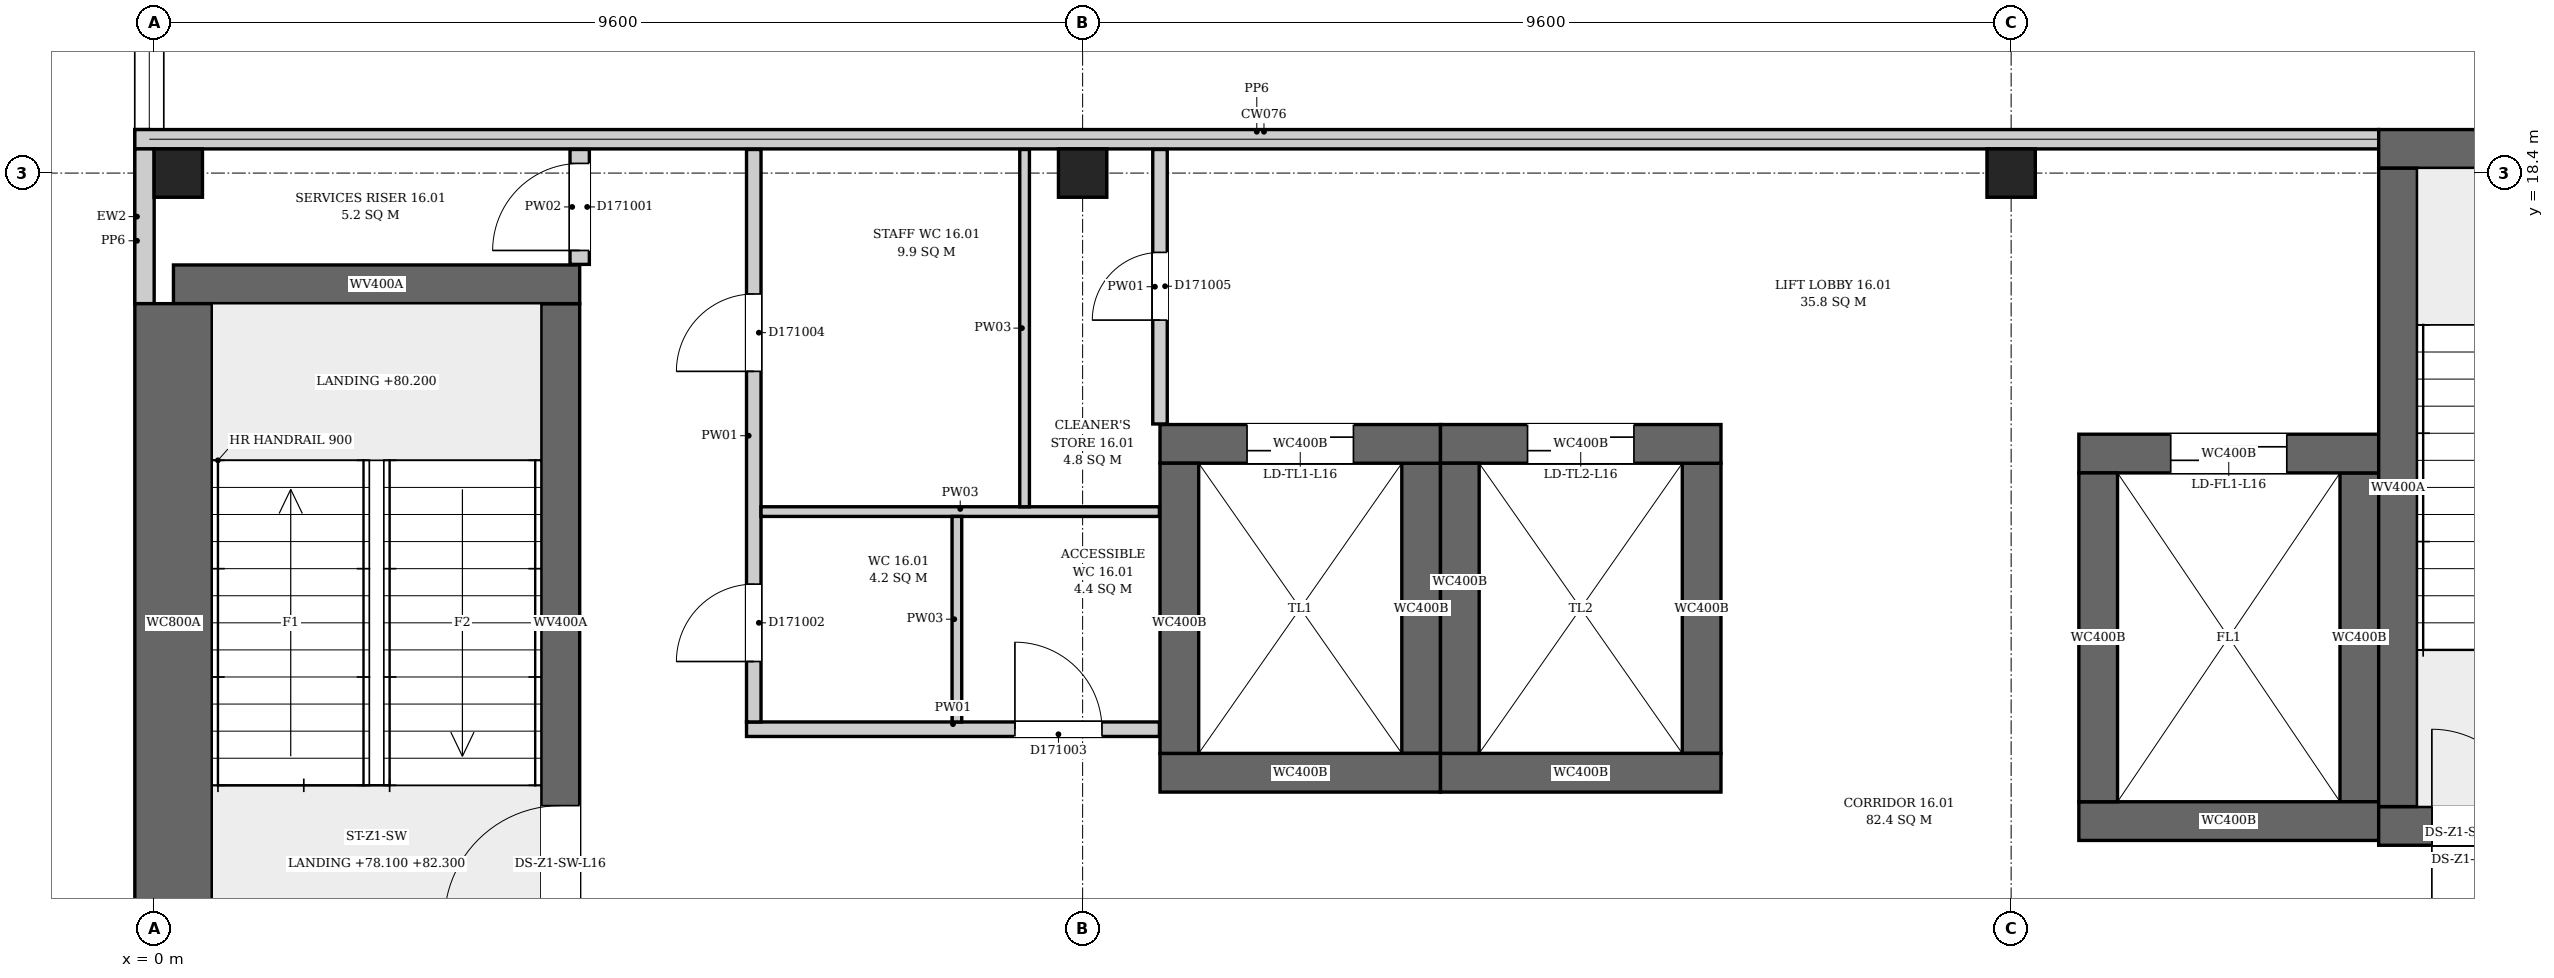
"""IFC4 building model, lengths in metres.
Left out: names, types, materials, properties, quantities, classifications, styles, units other than length and angle.
Written with IfcOpenShell. Run it as: python <this file> out.ifc"""

import sys

from ifc_helpers import new_model, si_unit, direction, frame, frame_2d, origin, origin_2d, place, context, subcontext, project, spatial, rectangle, extrude, element, fill, save


model = new_model("IFC4")
c1 = context("Model", 3, precision=1e-05, world=origin(), true_north=direction((0.0, 1.0)))
c2 = subcontext(c1, "Body", "Model", "MODEL_VIEW")
j1 = project(units=[si_unit("LENGTHUNIT", "METRE"), si_unit("PLANEANGLEUNIT", "RADIAN")], contexts=[c1])
p1 = place(None, origin())
s1 = spatial("IfcSite", under=j1, at=p1, CompositionType="ELEMENT")
p2 = place(p1, origin())
s2 = spatial("IfcBuilding", under=s1, at=p2, CompositionType="ELEMENT")
p3 = place(p2, frame((0.0, 0.0, 78.1)))
s3 = spatial("IfcBuildingStorey", under=s2, at=p3, CompositionType="ELEMENT", Elevation=78.1)
p4 = place(p3, frame((0.2, 17.25, 0.0), z_axis=(0.0, 0.0, 1.0), x_axis=(1.0, 0.0, 0.0)))
e1 = element("IfcWall", 1, at=p4, inside=s3, PredefinedType="SHEAR", context=c2, shape_type="SweptSolid", body=[
    extrude(rectangle(XDim=4.2, YDim=0.4, at=frame_2d((2.1, 0.0))), origin(), (0.0, 0.0, 1.0), 7.1),
])
p5 = place(p3, frame((0.2, 10.45, 0.0), z_axis=(0.0, 0.0, 1.0), x_axis=(0.0, 1.0, 0.0)))
e2 = element("IfcWall", 2, at=p5, inside=s3, PredefinedType="SHEAR", context=c2, shape_type="SweptSolid", body=[
    extrude(rectangle(XDim=6.6, YDim=0.8, at=frame_2d((3.3, 0.0))), origin(), (0.0, 0.0, 1.0), 7.1),
])
p6 = place(p3, frame((4.2, 10.45, 0.0), z_axis=(0.0, 0.0, 1.0), x_axis=(0.0, 1.0, 0.0)))
e3 = element("IfcWall", 3, at=p6, inside=s3, PredefinedType="SHEAR", context=c2, shape_type="SweptSolid", body=[
    extrude(rectangle(XDim=6.6, YDim=0.4, at=frame_2d((3.3, 0.0))), origin(), (0.0, 0.0, 1.0), 7.1),
])
p7 = place(p6, frame((0.21, 0.0, 0.0)))
e4 = element("IfcOpeningElement", 4, at=p7, cuts=e3, PredefinedType="OPENING", context=c2, shape_type="SweptSolid", body=[
    extrude(rectangle(XDim=1.2, YDim=2.1, at=frame_2d((0.6, 1.05))), frame((0.0, 0.21, 0.0), z_axis=(0.0, -1.0, 0.0), x_axis=(1.0, 0.0, 0.0)), (0.0, 0.0, 1.0), 0.42),
])
p8 = place(p3, frame((23.0, 11.65, 0.0), z_axis=(0.0, 0.0, 1.0), x_axis=(1.0, 0.0, 0.0)))
e5 = element("IfcWall", 5, at=p8, inside=s3, PredefinedType="SHEAR", context=c2, shape_type="SweptSolid", body=[
    extrude(rectangle(XDim=4.2, YDim=0.4, at=frame_2d((2.1, 0.0))), origin(), (0.0, 0.0, 1.0), 7.1),
])
p9 = place(p8, frame((0.55, 0.0, 0.0)))
e6 = element("IfcOpeningElement", 6, at=p9, cuts=e5, PredefinedType="OPENING", context=c2, shape_type="SweptSolid", body=[
    extrude(rectangle(XDim=1.0, YDim=2.1, at=frame_2d((0.5, 1.05))), frame((0.0, 0.21, 0.0), z_axis=(0.0, -1.0, 0.0), x_axis=(1.0, 0.0, 0.0)), (0.0, 0.0, 1.0), 0.42),
])
p10 = place(p8, frame((2.65, 0.0, 0.0)))
e7 = element("IfcOpeningElement", 7, at=p10, cuts=e5, PredefinedType="OPENING", context=c2, shape_type="SweptSolid", body=[
    extrude(rectangle(XDim=1.0, YDim=2.1, at=frame_2d((0.5, 1.05))), frame((0.0, 0.21, 0.0), z_axis=(0.0, -1.0, 0.0), x_axis=(1.0, 0.0, 0.0)), (0.0, 0.0, 1.0), 0.42),
])
p11 = place(p8, frame((0.55, 0.0, 4.2)))
e8 = element("IfcOpeningElement", 8, at=p11, cuts=e5, PredefinedType="OPENING", context=c2, shape_type="SweptSolid", body=[
    extrude(rectangle(XDim=1.0, YDim=2.1, at=frame_2d((0.5, 1.05))), frame((0.0, 0.21, 0.0), z_axis=(0.0, -1.0, 0.0), x_axis=(1.0, 0.0, 0.0)), (0.0, 0.0, 1.0), 0.42),
])
p12 = place(p8, frame((2.65, 0.0, 4.2)))
e9 = element("IfcOpeningElement", 9, at=p12, cuts=e5, PredefinedType="OPENING", context=c2, shape_type="SweptSolid", body=[
    extrude(rectangle(XDim=1.0, YDim=2.1, at=frame_2d((0.5, 1.05))), frame((0.0, 0.21, 0.0), z_axis=(0.0, -1.0, 0.0), x_axis=(1.0, 0.0, 0.0)), (0.0, 0.0, 1.0), 0.42),
])
p13 = place(p3, frame((23.0, 18.65, 0.0), z_axis=(0.0, 0.0, 1.0), x_axis=(1.0, 0.0, 0.0)))
e10 = element("IfcWall", 10, at=p13, inside=s3, PredefinedType="SHEAR", context=c2, shape_type="SweptSolid", body=[
    extrude(rectangle(XDim=4.2, YDim=0.4, at=frame_2d((2.1, 0.0))), origin(), (0.0, 0.0, 1.0), 7.1),
])
p14 = place(p3, frame((23.2, 11.85, 0.0), z_axis=(0.0, 0.0, 1.0), x_axis=(0.0, 1.0, 0.0)))
e11 = element("IfcWall", 11, at=p14, inside=s3, PredefinedType="SHEAR", context=c2, shape_type="SweptSolid", body=[
    extrude(rectangle(XDim=6.6, YDim=0.4, at=frame_2d((3.3, 0.0))), origin(), (0.0, 0.0, 1.0), 7.1),
])
p15 = place(p3, frame((10.4, 12.2, 0.0), z_axis=(0.0, 0.0, 1.0), x_axis=(1.0, 0.0, 0.0)))
e12 = element("IfcWall", 12, at=p15, inside=s3, PredefinedType="SHEAR", context=c2, shape_type="SweptSolid", body=[
    extrude(rectangle(XDim=2.9, YDim=0.4, at=frame_2d((1.45, 0.0))), origin(), (0.0, 0.0, 1.0), 7.6),
])
p16 = place(p3, frame((10.4, 15.6, 0.0), z_axis=(0.0, 0.0, 1.0), x_axis=(1.0, 0.0, 0.0)))
e13 = element("IfcWall", 13, at=p16, inside=s3, PredefinedType="SHEAR", context=c2, shape_type="SweptSolid", body=[
    extrude(rectangle(XDim=2.9, YDim=0.4, at=frame_2d((1.45, 0.0))), origin(), (0.0, 0.0, 1.0), 7.6),
])
p17 = place(p16, frame((0.9, 0.0, 0.0)))
e14 = element("IfcOpeningElement", 14, at=p17, cuts=e13, PredefinedType="OPENING", context=c2, shape_type="SweptSolid", body=[
    extrude(rectangle(XDim=1.1, YDim=2.1, at=frame_2d((0.55, 1.05))), frame((0.0, 0.21, 0.0), z_axis=(0.0, -1.0, 0.0), x_axis=(1.0, 0.0, 0.0)), (0.0, 0.0, 1.0), 0.42),
])
for number, where, z_axis, x_axis in (
    (15, (10.6, 12.4, 0.0), (0.0, 0.0, 1.0), (0.0, 1.0, 0.0)),
    (16, (13.1, 12.4, 0.0), (0.0, 0.0, 1.0), (0.0, 1.0, 0.0)),
):
    element("IfcWall", number, at=place(p3, frame(where, z_axis=z_axis, x_axis=x_axis)), inside=s3, PredefinedType="SHEAR", context=c2, shape_type="SweptSolid", body=[
        extrude(rectangle(XDim=3.0, YDim=0.4, at=frame_2d((1.5, 0.0))), origin(), (0.0, 0.0, 1.0), 7.6),
    ])
p18 = place(p3, frame((13.3, 12.2, 0.0), z_axis=(0.0, 0.0, 1.0), x_axis=(1.0, 0.0, 0.0)))
e17 = element("IfcWall", 17, at=p18, inside=s3, PredefinedType="SHEAR", context=c2, shape_type="SweptSolid", body=[
    extrude(rectangle(XDim=2.9, YDim=0.4, at=frame_2d((1.45, 0.0))), origin(), (0.0, 0.0, 1.0), 7.6),
])
p19 = place(p3, frame((13.3, 15.6, 0.0), z_axis=(0.0, 0.0, 1.0), x_axis=(1.0, 0.0, 0.0)))
e18 = element("IfcWall", 18, at=p19, inside=s3, PredefinedType="SHEAR", context=c2, shape_type="SweptSolid", body=[
    extrude(rectangle(XDim=2.9, YDim=0.4, at=frame_2d((1.45, 0.0))), origin(), (0.0, 0.0, 1.0), 7.6),
])
p20 = place(p19, frame((0.9, 0.0, 0.0)))
e19 = element("IfcOpeningElement", 19, at=p20, cuts=e18, PredefinedType="OPENING", context=c2, shape_type="SweptSolid", body=[
    extrude(rectangle(XDim=1.1, YDim=2.1, at=frame_2d((0.55, 1.05))), frame((0.0, 0.21, 0.0), z_axis=(0.0, -1.0, 0.0), x_axis=(1.0, 0.0, 0.0)), (0.0, 0.0, 1.0), 0.42),
])
for number, where, z_axis, x_axis in (
    (20, (13.5, 12.4, 0.0), (0.0, 0.0, 1.0), (0.0, 1.0, 0.0)),
    (21, (16.0, 12.4, 0.0), (0.0, 0.0, 1.0), (0.0, 1.0, 0.0)),
):
    element("IfcWall", number, at=place(p3, frame(where, z_axis=z_axis, x_axis=x_axis)), inside=s3, PredefinedType="SHEAR", context=c2, shape_type="SweptSolid", body=[
        extrude(rectangle(XDim=3.0, YDim=0.4, at=frame_2d((1.5, 0.0))), origin(), (0.0, 0.0, 1.0), 7.6),
    ])
p21 = place(p3, frame((19.9, 11.7, 0.0), z_axis=(0.0, 0.0, 1.0), x_axis=(1.0, 0.0, 0.0)))
e22 = element("IfcWall", 22, at=p21, inside=s3, PredefinedType="SHEAR", context=c2, shape_type="SweptSolid", body=[
    extrude(rectangle(XDim=3.1, YDim=0.4, at=frame_2d((1.55, 0.0))), origin(), (0.0, 0.0, 1.0), 7.6),
])
p22 = place(p3, frame((19.9, 15.5, 0.0), z_axis=(0.0, 0.0, 1.0), x_axis=(1.0, 0.0, 0.0)))
e23 = element("IfcWall", 23, at=p22, inside=s3, PredefinedType="SHEAR", context=c2, shape_type="SweptSolid", body=[
    extrude(rectangle(XDim=3.1, YDim=0.4, at=frame_2d((1.55, 0.0))), origin(), (0.0, 0.0, 1.0), 7.6),
])
p23 = place(p22, frame((0.95, 0.0, 0.0)))
e24 = element("IfcOpeningElement", 24, at=p23, cuts=e23, PredefinedType="OPENING", context=c2, shape_type="SweptSolid", body=[
    extrude(rectangle(XDim=1.2, YDim=2.1, at=frame_2d((0.6, 1.05))), frame((0.0, 0.21, 0.0), z_axis=(0.0, -1.0, 0.0), x_axis=(1.0, 0.0, 0.0)), (0.0, 0.0, 1.0), 0.42),
])
for number, where, z_axis, x_axis in (
    (25, (20.1, 11.9, 0.0), (0.0, 0.0, 1.0), (0.0, 1.0, 0.0)),
    (26, (22.8, 11.9, 0.0), (0.0, 0.0, 1.0), (0.0, 1.0, 0.0)),
):
    element("IfcWall", number, at=place(p3, frame(where, z_axis=z_axis, x_axis=x_axis)), inside=s3, PredefinedType="SHEAR", context=c2, shape_type="SweptSolid", body=[
        extrude(rectangle(XDim=3.4, YDim=0.4, at=frame_2d((1.7, 0.0))), origin(), (0.0, 0.0, 1.0), 7.6),
    ])
for number, where, z_axis, x_axis in (
    (27, (0.25, 18.4, 0.0), (0.0, 0.0, 1.0), (1.0, 0.0, 0.0)),
    (28, (9.6, 18.4, 0.0), (0.0, 0.0, 1.0), (1.0, 0.0, 0.0)),
    (29, (19.2, 18.4, 0.0), (0.0, 0.0, 1.0), (1.0, 0.0, 0.0)),
):
    element("IfcColumn", number, at=place(p3, frame(where, z_axis=z_axis, x_axis=x_axis)), inside=s3, PredefinedType="COLUMN", context=c2, shape_type="SweptSolid", body=[
        extrude(rectangle(XDim=0.5, YDim=0.5, at=origin_2d()), origin(), (0.0, 0.0, 1.0), 3.9),
    ])
p24 = place(p3, frame((-0.125, 18.85, 0.0), z_axis=(0.0, 0.0, 1.0), x_axis=(0.0, -1.0, 0.0)))
e30 = element("IfcWall", 30, at=p24, inside=s3, PredefinedType="ELEMENTEDWALL", context=c2, shape_type="SweptSolid", body=[
    extrude(rectangle(XDim=1.8, YDim=0.15, at=frame_2d((0.9, 0.0))), origin(), (0.0, 0.0, 1.0), 3.9),
])
p25 = place(p3, frame((23.0, 18.75, 4.2), z_axis=(0.0, 0.0, 1.0), x_axis=(-1.0, 0.0, 0.0)))
e31 = element("IfcWall", 31, at=p25, inside=s3, PredefinedType="PARAPET", context=c2, shape_type="SweptSolid", body=[
    extrude(rectangle(XDim=23.2, YDim=0.2, at=frame_2d((11.6, 0.0))), origin(), (0.0, 0.0, 1.0), 1.1),
])
p26 = place(p3, frame((-0.099, 18.65, 4.2), z_axis=(0.0, 0.0, 1.0), x_axis=(0.0, -1.0, 0.0)))
e32 = element("IfcWall", 32, at=p26, inside=s3, PredefinedType="PARAPET", context=c2, shape_type="SweptSolid", body=[
    extrude(rectangle(XDim=1.6, YDim=0.2, at=frame_2d((0.8, 0.0))), origin(), (0.0, 0.0, 1.0), 1.1),
])
p27 = place(p3, frame((4.4, 17.456, 0.0), z_axis=(0.0, 0.0, 1.0), x_axis=(0.0, 1.0, 0.0)))
e33 = element("IfcWall", 33, at=p27, inside=s3, PredefinedType="PARTITIONING", context=c2, shape_type="SweptSolid", body=[
    extrude(rectangle(XDim=1.188, YDim=0.2, at=frame_2d((0.594, 0.0))), origin(), (0.0, 0.0, 1.0), 3.9),
])
p28 = place(p27, frame((0.144, 0.0, 0.0)))
e34 = element("IfcOpeningElement", 34, at=p28, cuts=e33, PredefinedType="OPENING", context=c2, shape_type="SweptSolid", body=[
    extrude(rectangle(XDim=0.9, YDim=2.1, at=frame_2d((0.45, 1.05))), frame((0.0, 0.11, 0.0), z_axis=(0.0, -1.0, 0.0), x_axis=(1.0, 0.0, 0.0)), (0.0, 0.0, 1.0), 0.22),
])
p29 = place(p3, frame((6.125, 12.65, 0.0), z_axis=(0.0, 0.0, 1.0), x_axis=(1.0, 0.0, 0.0)))
e35 = element("IfcWall", 35, at=p29, inside=s3, PredefinedType="PARTITIONING", context=c2, shape_type="SweptSolid", body=[
    extrude(rectangle(XDim=4.269, YDim=0.15, at=frame_2d((2.135, 0.0))), origin(), (0.0, 0.0, 1.0), 3.9),
])
p30 = place(p29, frame((2.775, 0.0, 0.0)))
e36 = element("IfcOpeningElement", 36, at=p30, cuts=e35, PredefinedType="OPENING", context=c2, shape_type="SweptSolid", body=[
    extrude(rectangle(XDim=0.9, YDim=2.1, at=frame_2d((0.45, 1.05))), frame((0.0, 0.085, 0.0), z_axis=(0.0, -1.0, 0.0), x_axis=(1.0, 0.0, 0.0)), (0.0, 0.0, 1.0), 0.17),
])
p31 = place(p3, frame((6.2, 12.725, 0.0), z_axis=(0.0, 0.0, 1.0), x_axis=(0.0, 1.0, 0.0)))
e37 = element("IfcWall", 37, at=p31, inside=s3, PredefinedType="PARTITIONING", context=c2, shape_type="SweptSolid", body=[
    extrude(rectangle(XDim=5.919, YDim=0.15, at=frame_2d((2.959, 0.0))), origin(), (0.0, 0.0, 1.0), 3.9),
])
p32 = place(p31, frame((0.625, 0.0, 0.0)))
e38 = element("IfcOpeningElement", 38, at=p32, cuts=e37, PredefinedType="OPENING", context=c2, shape_type="SweptSolid", body=[
    extrude(rectangle(XDim=0.8, YDim=2.1, at=frame_2d((0.4, 1.05))), frame((0.0, 0.085, 0.0), z_axis=(0.0, -1.0, 0.0), x_axis=(1.0, 0.0, 0.0)), (0.0, 0.0, 1.0), 0.17),
])
p33 = place(p31, frame((3.625, 0.0, 0.0)))
e39 = element("IfcOpeningElement", 39, at=p33, cuts=e37, PredefinedType="OPENING", context=c2, shape_type="SweptSolid", body=[
    extrude(rectangle(XDim=0.8, YDim=2.1, at=frame_2d((0.4, 1.05))), frame((0.0, 0.085, 0.0), z_axis=(0.0, -1.0, 0.0), x_axis=(1.0, 0.0, 0.0)), (0.0, 0.0, 1.0), 0.17),
])
p34 = place(p3, frame((6.275, 14.9, 0.0), z_axis=(0.0, 0.0, 1.0), x_axis=(1.0, 0.0, 0.0)))
e40 = element("IfcWall", 40, at=p34, inside=s3, PredefinedType="PARTITIONING", context=c2, shape_type="SweptSolid", body=[
    extrude(rectangle(XDim=4.119, YDim=0.1, at=frame_2d((2.06, 0.0))), origin(), (0.0, 0.0, 1.0), 3.9),
])
p35 = place(p3, frame((8.3, 12.725, 0.0), z_axis=(0.0, 0.0, 1.0), x_axis=(0.0, 1.0, 0.0)))
e41 = element("IfcWall", 41, at=p35, inside=s3, PredefinedType="PARTITIONING", context=c2, shape_type="SweptSolid", body=[
    extrude(rectangle(XDim=2.125, YDim=0.1, at=frame_2d((1.062, 0.0))), origin(), (0.0, 0.0, 1.0), 3.9),
])
p36 = place(p3, frame((9.0, 14.95, 0.0), z_axis=(0.0, 0.0, 1.0), x_axis=(0.0, 1.0, 0.0)))
e42 = element("IfcWall", 42, at=p36, inside=s3, PredefinedType="PARTITIONING", context=c2, shape_type="SweptSolid", body=[
    extrude(rectangle(XDim=3.694, YDim=0.1, at=frame_2d((1.847, 0.0))), origin(), (0.0, 0.0, 1.0), 3.9),
])
p37 = place(p3, frame((10.4, 15.806, 0.0), z_axis=(0.0, 0.0, 1.0), x_axis=(0.0, 1.0, 0.0)))
e43 = element("IfcWall", 43, at=p37, inside=s3, PredefinedType="PARTITIONING", context=c2, shape_type="SweptSolid", body=[
    extrude(rectangle(XDim=2.838, YDim=0.15, at=frame_2d((1.419, 0.0))), origin(), (0.0, 0.0, 1.0), 3.9),
])
p38 = place(p37, frame((1.074, 0.0, 0.0)))
e44 = element("IfcOpeningElement", 44, at=p38, cuts=e43, PredefinedType="OPENING", context=c2, shape_type="SweptSolid", body=[
    extrude(rectangle(XDim=0.7, YDim=2.1, at=frame_2d((0.35, 1.05))), frame((0.0, 0.085, 0.0), z_axis=(0.0, -1.0, 0.0), x_axis=(1.0, 0.0, 0.0)), (0.0, 0.0, 1.0), 0.17),
])
p39 = place(p7, origin())
e45 = element("IfcDoor", 45, at=p39, inside=s3, OperationType="SINGLE_SWING_RIGHT", PredefinedType="DOOR", context=c2, shape_type="SweptSolid", body=[
    extrude(rectangle(XDim=1.2, YDim=2.1, at=frame_2d((0.6, 1.05))), frame((0.0, 0.025, 0.0), z_axis=(0.0, -1.0, 0.0), x_axis=(1.0, 0.0, 0.0)), (0.0, 0.0, 1.0), 0.05),
])
fill(e4, e45)
p40 = place(p9, origin())
e46 = element("IfcDoor", 46, at=p40, inside=s3, OperationType="SINGLE_SWING_RIGHT", PredefinedType="DOOR", context=c2, shape_type="SweptSolid", body=[
    extrude(rectangle(XDim=1.0, YDim=2.1, at=frame_2d((0.5, 1.05))), frame((0.0, 0.025, 0.0), z_axis=(0.0, -1.0, 0.0), x_axis=(1.0, 0.0, 0.0)), (0.0, 0.0, 1.0), 0.05),
])
fill(e6, e46)
p41 = place(p11, frame((1.0, 0.0, 0.0), z_axis=(0.0, 0.0, 1.0), x_axis=(-1.0, 0.0, 0.0)))
e47 = element("IfcDoor", 47, at=p41, inside=s3, OperationType="SINGLE_SWING_LEFT", PredefinedType="DOOR", context=c2, shape_type="SweptSolid", body=[
    extrude(rectangle(XDim=1.0, YDim=2.1, at=frame_2d((0.5, 1.05))), frame((0.0, 0.025, 0.0), z_axis=(0.0, -1.0, 0.0), x_axis=(1.0, 0.0, 0.0)), (0.0, 0.0, 1.0), 0.05),
])
fill(e8, e47)
p42 = place(p17, origin())
e48 = element("IfcDoor", 48, at=p42, inside=s3, OperationType="DOUBLE_DOOR_SLIDING", PredefinedType="DOOR", context=c2, shape_type="SweptSolid", body=[
    extrude(rectangle(XDim=1.1, YDim=2.1, at=frame_2d((0.55, 1.05))), frame((0.0, 0.025, 0.0), z_axis=(0.0, -1.0, 0.0), x_axis=(1.0, 0.0, 0.0)), (0.0, 0.0, 1.0), 0.05),
])
fill(e14, e48)
p43 = place(p20, origin())
e49 = element("IfcDoor", 49, at=p43, inside=s3, OperationType="DOUBLE_DOOR_SLIDING", PredefinedType="DOOR", context=c2, shape_type="SweptSolid", body=[
    extrude(rectangle(XDim=1.1, YDim=2.1, at=frame_2d((0.55, 1.05))), frame((0.0, 0.025, 0.0), z_axis=(0.0, -1.0, 0.0), x_axis=(1.0, 0.0, 0.0)), (0.0, 0.0, 1.0), 0.05),
])
fill(e19, e49)
p44 = place(p23, origin())
e50 = element("IfcDoor", 50, at=p44, inside=s3, OperationType="DOUBLE_DOOR_SLIDING", PredefinedType="DOOR", context=c2, shape_type="SweptSolid", body=[
    extrude(rectangle(XDim=1.2, YDim=2.1, at=frame_2d((0.6, 1.05))), frame((0.0, 0.025, 0.0), z_axis=(0.0, -1.0, 0.0), x_axis=(1.0, 0.0, 0.0)), (0.0, 0.0, 1.0), 0.05),
])
fill(e24, e50)
p45 = place(p28, origin())
e51 = element("IfcDoor", 51, at=p45, inside=s3, OperationType="SINGLE_SWING_LEFT", PredefinedType="DOOR", context=c2, shape_type="SweptSolid", body=[
    extrude(rectangle(XDim=0.9, YDim=2.1, at=frame_2d((0.45, 1.05))), frame((0.0, 0.025, 0.0), z_axis=(0.0, -1.0, 0.0), x_axis=(1.0, 0.0, 0.0)), (0.0, 0.0, 1.0), 0.05),
])
fill(e34, e51)
p46 = place(p32, origin())
e52 = element("IfcDoor", 52, at=p46, inside=s3, OperationType="SINGLE_SWING_LEFT", PredefinedType="DOOR", context=c2, shape_type="SweptSolid", body=[
    extrude(rectangle(XDim=0.8, YDim=2.1, at=frame_2d((0.4, 1.05))), frame((0.0, 0.025, 0.0), z_axis=(0.0, -1.0, 0.0), x_axis=(1.0, 0.0, 0.0)), (0.0, 0.0, 1.0), 0.05),
])
fill(e38, e52)
p47 = place(p30, origin())
e53 = element("IfcDoor", 53, at=p47, inside=s3, OperationType="SINGLE_SWING_RIGHT", PredefinedType="DOOR", context=c2, shape_type="SweptSolid", body=[
    extrude(rectangle(XDim=0.9, YDim=2.1, at=frame_2d((0.45, 1.05))), frame((0.0, 0.025, 0.0), z_axis=(0.0, -1.0, 0.0), x_axis=(1.0, 0.0, 0.0)), (0.0, 0.0, 1.0), 0.05),
])
fill(e36, e53)
p48 = place(p33, origin())
e54 = element("IfcDoor", 54, at=p48, inside=s3, OperationType="SINGLE_SWING_LEFT", PredefinedType="DOOR", context=c2, shape_type="SweptSolid", body=[
    extrude(rectangle(XDim=0.8, YDim=2.1, at=frame_2d((0.4, 1.05))), frame((0.0, 0.025, 0.0), z_axis=(0.0, -1.0, 0.0), x_axis=(1.0, 0.0, 0.0)), (0.0, 0.0, 1.0), 0.05),
])
fill(e39, e54)
p49 = place(p38, origin())
e55 = element("IfcDoor", 55, at=p49, inside=s3, OperationType="SINGLE_SWING_LEFT", PredefinedType="DOOR", context=c2, shape_type="SweptSolid", body=[
    extrude(rectangle(XDim=0.7, YDim=2.1, at=frame_2d((0.35, 1.05))), frame((0.0, 0.025, 0.0), z_axis=(0.0, -1.0, 0.0), x_axis=(1.0, 0.0, 0.0)), (0.0, 0.0, 1.0), 0.05),
])
fill(e44, e55)
save(model, sys.argv[1])
